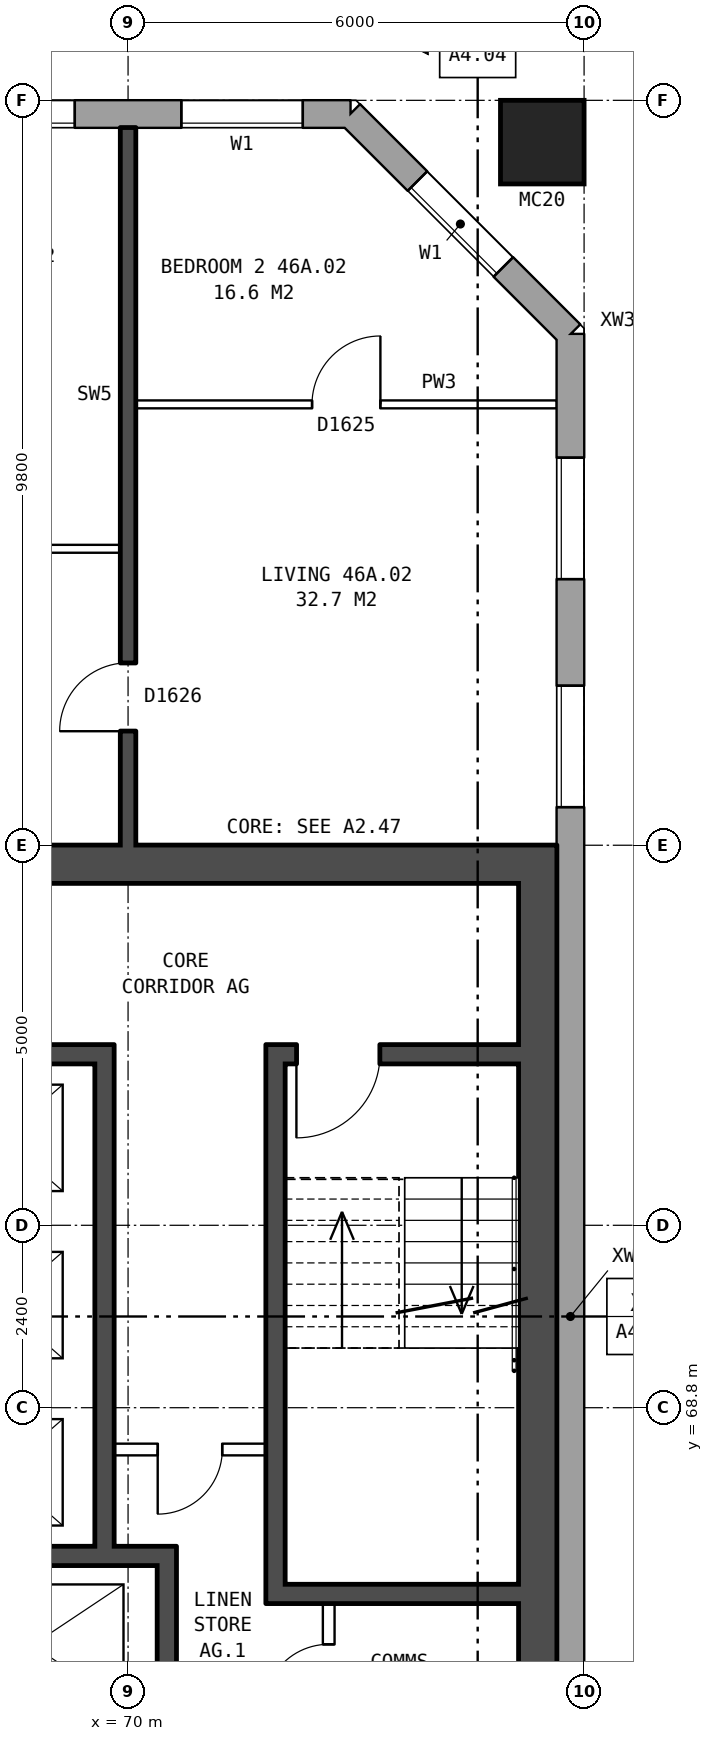
"""IFC4 building model, lengths in metres.
Left out: names, types, materials, properties, quantities, classifications, styles, units other than length and angle.
Written with IfcOpenShell. Run it as: python <this file> out.ifc"""

import sys

from ifc_helpers import new_model, si_unit, direction, frame, frame_2d, origin, origin_2d, place, context, subcontext, project, spatial, rectangle, hollow_rectangle, extrude, element, fill, save


model = new_model("IFC4")
c1 = context("Model", 3, precision=1e-05, world=origin(), true_north=direction((0.0, 1.0)))
c2 = subcontext(c1, "Body", "Model", "MODEL_VIEW")
j1 = project(units=[si_unit("LENGTHUNIT", "METRE"), si_unit("PLANEANGLEUNIT", "RADIAN")], contexts=[c1])
p1 = place(None, origin())
s1 = spatial("IfcSite", under=j1, at=p1, CompositionType="ELEMENT")
p2 = place(p1, origin())
s2 = spatial("IfcBuilding", under=s1, at=p2, CompositionType="ELEMENT")
p3 = place(p2, frame((0.0, 0.0, 164.0)))
s3 = spatial("IfcBuildingStorey", under=s2, at=p3, CompositionType="ELEMENT", Elevation=164.0)
p4 = place(p3, frame((75.45, 85.45, 0.0), z_axis=(0.0, 0.0, 1.0), x_axis=(1.0, 0.0, 0.0)))
e1 = element("IfcColumn", 1, at=p4, inside=s3, PredefinedType="COLUMN", context=c2, shape_type="SweptSolid", body=[
    extrude(hollow_rectangle(XDim=1.1, YDim=1.1, WallThickness=0.06, at=origin_2d()), origin(), (0.0, 0.0, 1.0), 3.1),
])
p5 = place(p3, frame((75.82, 57.075, 0.0), z_axis=(0.0, 0.0, 1.0), x_axis=(0.0, 1.0, 0.0)))
e2 = element("IfcWall", 2, at=p5, inside=s3, PredefinedType="STANDARD", context=c2, shape_type="SweptSolid", body=[
    extrude(rectangle(XDim=25.851, YDim=0.36, at=frame_2d((12.925, 0.0))), origin(), (0.0, 0.0, 1.0), 2.85),
])
p6 = place(p5, frame((1.625, 0.0, 0.8)))
e3 = element("IfcOpeningElement", 3, at=p6, cuts=e2, PredefinedType="OPENING", context=c2, shape_type="SweptSolid", body=[
    extrude(rectangle(XDim=1.6, YDim=1.8, at=frame_2d((0.8, 0.9))), frame((0.0, 0.19, 0.0), z_axis=(0.0, -1.0, 0.0), x_axis=(1.0, 0.0, 0.0)), (0.0, 0.0, 1.0), 0.38),
])
p7 = place(p5, frame((4.625, 0.0, 0.8)))
e4 = element("IfcOpeningElement", 4, at=p7, cuts=e2, PredefinedType="OPENING", context=c2, shape_type="SweptSolid", body=[
    extrude(rectangle(XDim=1.6, YDim=1.8, at=frame_2d((0.8, 0.9))), frame((0.0, 0.19, 0.0), z_axis=(0.0, -1.0, 0.0), x_axis=(1.0, 0.0, 0.0)), (0.0, 0.0, 1.0), 0.38),
])
p8 = place(p5, frame((19.625, 0.0, 0.8)))
e5 = element("IfcOpeningElement", 5, at=p8, cuts=e2, PredefinedType="OPENING", context=c2, shape_type="SweptSolid", body=[
    extrude(rectangle(XDim=1.6, YDim=1.8, at=frame_2d((0.8, 0.9))), frame((0.0, 0.19, 0.0), z_axis=(0.0, -1.0, 0.0), x_axis=(1.0, 0.0, 0.0)), (0.0, 0.0, 1.0), 0.38),
])
p9 = place(p5, frame((22.625, 0.0, 0.8)))
e6 = element("IfcOpeningElement", 6, at=p9, cuts=e2, PredefinedType="OPENING", context=c2, shape_type="SweptSolid", body=[
    extrude(rectangle(XDim=1.6, YDim=1.8, at=frame_2d((0.8, 0.9))), frame((0.0, 0.19, 0.0), z_axis=(0.0, -1.0, 0.0), x_axis=(1.0, 0.0, 0.0)), (0.0, 0.0, 1.0), 0.38),
])
p10 = place(p3, frame((75.82, 82.925, 0.0), z_axis=(0.0, 0.0, 1.0), x_axis=(-0.707106781187, 0.707106781187, 0.0)))
e7 = element("IfcWall", 7, at=p10, inside=s3, PredefinedType="STANDARD", context=c2, shape_type="SweptSolid", body=[
    extrude(rectangle(XDim=4.094, YDim=0.36, at=frame_2d((2.047, 0.0))), origin(), (0.0, 0.0, 1.0), 2.85),
])
p11 = place(p10, frame((1.247, 0.0, 0.8)))
e8 = element("IfcOpeningElement", 8, at=p11, cuts=e7, PredefinedType="OPENING", context=c2, shape_type="SweptSolid", body=[
    extrude(rectangle(XDim=1.6, YDim=1.8, at=frame_2d((0.8, 0.9))), frame((0.0, 0.19, 0.0), z_axis=(0.0, -1.0, 0.0), x_axis=(1.0, 0.0, 0.0)), (0.0, 0.0, 1.0), 0.38),
])
p12 = place(p3, frame((72.925, 85.82, 0.0), z_axis=(0.0, 0.0, 1.0), x_axis=(-1.0, 0.0, 0.0)))
e9 = element("IfcWall", 9, at=p12, inside=s3, PredefinedType="STANDARD", context=c2, shape_type="SweptSolid", body=[
    extrude(rectangle(XDim=41.351, YDim=0.36, at=frame_2d((20.675, 0.0))), origin(), (0.0, 0.0, 1.0), 2.85),
])
p13 = place(p12, frame((0.625, 0.0, 0.8)))
e10 = element("IfcOpeningElement", 10, at=p13, cuts=e9, PredefinedType="OPENING", context=c2, shape_type="SweptSolid", body=[
    extrude(rectangle(XDim=1.6, YDim=1.8, at=frame_2d((0.8, 0.9))), frame((0.0, 0.19, 0.0), z_axis=(0.0, -1.0, 0.0), x_axis=(1.0, 0.0, 0.0)), (0.0, 0.0, 1.0), 0.38),
])
p14 = place(p12, frame((3.625, 0.0, 0.8)))
e11 = element("IfcOpeningElement", 11, at=p14, cuts=e9, PredefinedType="OPENING", context=c2, shape_type="SweptSolid", body=[
    extrude(rectangle(XDim=1.6, YDim=1.8, at=frame_2d((0.8, 0.9))), frame((0.0, 0.19, 0.0), z_axis=(0.0, -1.0, 0.0), x_axis=(1.0, 0.0, 0.0)), (0.0, 0.0, 1.0), 0.38),
])
p15 = place(p12, frame((6.625, 0.0, 0.8)))
e12 = element("IfcOpeningElement", 12, at=p15, cuts=e9, PredefinedType="OPENING", context=c2, shape_type="SweptSolid", body=[
    extrude(rectangle(XDim=1.6, YDim=1.8, at=frame_2d((0.8, 0.9))), frame((0.0, 0.19, 0.0), z_axis=(0.0, -1.0, 0.0), x_axis=(1.0, 0.0, 0.0)), (0.0, 0.0, 1.0), 0.38),
])
p16 = place(p12, frame((9.625, 0.0, 0.8)))
e13 = element("IfcOpeningElement", 13, at=p16, cuts=e9, PredefinedType="OPENING", context=c2, shape_type="SweptSolid", body=[
    extrude(rectangle(XDim=1.6, YDim=1.8, at=frame_2d((0.8, 0.9))), frame((0.0, 0.19, 0.0), z_axis=(0.0, -1.0, 0.0), x_axis=(1.0, 0.0, 0.0)), (0.0, 0.0, 1.0), 0.38),
])
p17 = place(p12, frame((12.625, 0.0, 0.8)))
e14 = element("IfcOpeningElement", 14, at=p17, cuts=e9, PredefinedType="OPENING", context=c2, shape_type="SweptSolid", body=[
    extrude(rectangle(XDim=1.6, YDim=1.8, at=frame_2d((0.8, 0.9))), frame((0.0, 0.19, 0.0), z_axis=(0.0, -1.0, 0.0), x_axis=(1.0, 0.0, 0.0)), (0.0, 0.0, 1.0), 0.38),
])
p18 = place(p12, frame((15.625, 0.0, 0.8)))
e15 = element("IfcOpeningElement", 15, at=p18, cuts=e9, PredefinedType="OPENING", context=c2, shape_type="SweptSolid", body=[
    extrude(rectangle(XDim=1.6, YDim=1.8, at=frame_2d((0.8, 0.9))), frame((0.0, 0.19, 0.0), z_axis=(0.0, -1.0, 0.0), x_axis=(1.0, 0.0, 0.0)), (0.0, 0.0, 1.0), 0.38),
])
p19 = place(p12, frame((18.075, 0.0, 1.65)))
e16 = element("IfcOpeningElement", 16, at=p19, cuts=e9, PredefinedType="OPENING", context=c2, shape_type="SweptSolid", body=[
    extrude(rectangle(XDim=0.6, YDim=0.9, at=frame_2d((0.3, 0.45))), frame((0.0, 0.19, 0.0), z_axis=(0.0, -1.0, 0.0), x_axis=(1.0, 0.0, 0.0)), (0.0, 0.0, 1.0), 0.38),
])
p20 = place(p12, frame((21.125, 0.0, 0.15)))
e17 = element("IfcOpeningElement", 17, at=p20, cuts=e9, PredefinedType="OPENING", context=c2, shape_type="SweptSolid", body=[
    extrude(rectangle(XDim=1.0, YDim=0.9, at=frame_2d((0.5, 0.45))), frame((0.0, 0.19, 0.0), z_axis=(0.0, -1.0, 0.0), x_axis=(1.0, 0.0, 0.0)), (0.0, 0.0, 1.0), 0.38),
])
p21 = place(p12, frame((24.625, 0.0, 0.8)))
e18 = element("IfcOpeningElement", 18, at=p21, cuts=e9, PredefinedType="OPENING", context=c2, shape_type="SweptSolid", body=[
    extrude(rectangle(XDim=1.6, YDim=1.8, at=frame_2d((0.8, 0.9))), frame((0.0, 0.19, 0.0), z_axis=(0.0, -1.0, 0.0), x_axis=(1.0, 0.0, 0.0)), (0.0, 0.0, 1.0), 0.38),
])
p22 = place(p12, frame((27.625, 0.0, 0.8)))
e19 = element("IfcOpeningElement", 19, at=p22, cuts=e9, PredefinedType="OPENING", context=c2, shape_type="SweptSolid", body=[
    extrude(rectangle(XDim=1.6, YDim=1.8, at=frame_2d((0.8, 0.9))), frame((0.0, 0.19, 0.0), z_axis=(0.0, -1.0, 0.0), x_axis=(1.0, 0.0, 0.0)), (0.0, 0.0, 1.0), 0.38),
])
p23 = place(p12, frame((30.625, 0.0, 0.8)))
e20 = element("IfcOpeningElement", 20, at=p23, cuts=e9, PredefinedType="OPENING", context=c2, shape_type="SweptSolid", body=[
    extrude(rectangle(XDim=1.6, YDim=1.8, at=frame_2d((0.8, 0.9))), frame((0.0, 0.19, 0.0), z_axis=(0.0, -1.0, 0.0), x_axis=(1.0, 0.0, 0.0)), (0.0, 0.0, 1.0), 0.38),
])
p24 = place(p12, frame((33.625, 0.0, 0.8)))
e21 = element("IfcOpeningElement", 21, at=p24, cuts=e9, PredefinedType="OPENING", context=c2, shape_type="SweptSolid", body=[
    extrude(rectangle(XDim=1.6, YDim=1.8, at=frame_2d((0.8, 0.9))), frame((0.0, 0.19, 0.0), z_axis=(0.0, -1.0, 0.0), x_axis=(1.0, 0.0, 0.0)), (0.0, 0.0, 1.0), 0.38),
])
p25 = place(p12, frame((36.625, 0.0, 0.8)))
e22 = element("IfcOpeningElement", 22, at=p25, cuts=e9, PredefinedType="OPENING", context=c2, shape_type="SweptSolid", body=[
    extrude(rectangle(XDim=1.6, YDim=1.8, at=frame_2d((0.8, 0.9))), frame((0.0, 0.19, 0.0), z_axis=(0.0, -1.0, 0.0), x_axis=(1.0, 0.0, 0.0)), (0.0, 0.0, 1.0), 0.38),
])
p26 = place(p12, frame((19.225, 0.0, 0.15)))
e23 = element("IfcOpeningElement", 23, at=p26, cuts=e9, PredefinedType="OPENING", context=c2, shape_type="SweptSolid", body=[
    extrude(rectangle(XDim=0.6, YDim=0.9, at=frame_2d((0.3, 0.45))), frame((0.0, 0.19, 0.0), z_axis=(0.0, -1.0, 0.0), x_axis=(1.0, 0.0, 0.0)), (0.0, 0.0, 1.0), 0.38),
])
p27 = place(p12, frame((20.125, 0.0, 0.25)))
e24 = element("IfcOpeningElement", 24, at=p27, cuts=e9, PredefinedType="OPENING", context=c2, shape_type="SweptSolid", body=[
    extrude(rectangle(XDim=0.6, YDim=1.5, at=frame_2d((0.3, 0.75))), frame((0.0, 0.19, 0.0), z_axis=(0.0, -1.0, 0.0), x_axis=(1.0, 0.0, 0.0)), (0.0, 0.0, 1.0), 0.38),
])
p28 = place(p12, frame((22.625, 0.0, 1.65)))
e25 = element("IfcOpeningElement", 25, at=p28, cuts=e9, PredefinedType="OPENING", context=c2, shape_type="SweptSolid", body=[
    extrude(rectangle(XDim=1.0, YDim=0.9, at=frame_2d((0.5, 0.45))), frame((0.0, 0.19, 0.0), z_axis=(0.0, -1.0, 0.0), x_axis=(1.0, 0.0, 0.0)), (0.0, 0.0, 1.0), 0.38),
])
p29 = place(p3, frame((75.39, 63.8, 0.0), z_axis=(0.0, 0.0, 1.0), x_axis=(0.0, 1.0, 0.0)))
e26 = element("IfcWall", 26, at=p29, inside=s3, PredefinedType="SHEAR", context=c2, shape_type="SweptSolid", body=[
    extrude(rectangle(XDim=12.4, YDim=0.5, at=frame_2d((6.2, 0.0))), origin(), (0.0, 0.0, 1.0), 2.85),
])
p30 = place(p3, frame((67.14, 75.95, 0.0), z_axis=(0.0, 0.0, 1.0), x_axis=(1.0, 0.0, 0.0)))
e27 = element("IfcWall", 27, at=p30, inside=s3, PredefinedType="SHEAR", context=c2, shape_type="SweptSolid", body=[
    extrude(rectangle(XDim=8.0, YDim=0.5, at=frame_2d((4.0, 0.0))), origin(), (0.0, 0.0, 1.0), 2.85),
])
p31 = place(p3, frame((72.065, 66.35, 0.0), z_axis=(0.0, 0.0, 1.0), x_axis=(1.0, 0.0, 0.0)))
e28 = element("IfcWall", 28, at=p31, inside=s3, PredefinedType="SHEAR", context=c2, shape_type="SweptSolid", body=[
    extrude(rectangle(XDim=3.075, YDim=0.25, at=frame_2d((1.538, 0.0))), origin(), (0.0, 0.0, 1.0), 2.85),
])
p32 = place(p3, frame((67.14, 66.85, 0.0), z_axis=(0.0, 0.0, 1.0), x_axis=(1.0, 0.0, 0.0)))
e29 = element("IfcWall", 29, at=p32, inside=s3, PredefinedType="SHEAR", context=c2, shape_type="SweptSolid", body=[
    extrude(rectangle(XDim=3.495, YDim=0.25, at=frame_2d((1.748, 0.0))), origin(), (0.0, 0.0, 1.0), 2.85),
])
p33 = place(p3, frame((69.815, 68.25, 0.0), z_axis=(0.0, 0.0, 1.0), x_axis=(1.0, 0.0, 0.0)))
e30 = element("IfcWall", 30, at=p33, inside=s3, PredefinedType="PARTITIONING", context=c2, shape_type="SweptSolid", body=[
    extrude(rectangle(XDim=2.0, YDim=0.15, at=frame_2d((1.0, 0.0))), origin(), (0.0, 0.0, 1.0), 2.85),
])
p34 = place(p33, frame((0.575, 0.0, 0.0)))
e31 = element("IfcOpeningElement", 31, at=p34, cuts=e30, PredefinedType="OPENING", context=c2, shape_type="SweptSolid", body=[
    extrude(rectangle(XDim=0.85, YDim=2.1, at=frame_2d((0.425, 1.05))), frame((0.0, 0.085, 0.0), z_axis=(0.0, -1.0, 0.0), x_axis=(1.0, 0.0, 0.0)), (0.0, 0.0, 1.0), 0.17),
])
p35 = place(p3, frame((67.14, 73.45, 0.0), z_axis=(0.0, 0.0, 1.0), x_axis=(1.0, 0.0, 0.0)))
e32 = element("IfcWall", 32, at=p35, inside=s3, PredefinedType="SHEAR", context=c2, shape_type="SweptSolid", body=[
    extrude(rectangle(XDim=2.425, YDim=0.25, at=frame_2d((1.212, 0.0))), origin(), (0.0, 0.0, 1.0), 2.85),
])
p36 = place(p3, frame((72.065, 73.45, 0.0), z_axis=(0.0, 0.0, 1.0), x_axis=(1.0, 0.0, 0.0)))
e33 = element("IfcWall", 33, at=p36, inside=s3, PredefinedType="SHEAR", context=c2, shape_type="SweptSolid", body=[
    extrude(rectangle(XDim=3.075, YDim=0.25, at=frame_2d((1.538, 0.0))), origin(), (0.0, 0.0, 1.0), 2.85),
])
p37 = place(p36, frame((0.15, 0.0, 0.0)))
e34 = element("IfcOpeningElement", 34, at=p37, cuts=e33, PredefinedType="OPENING", context=c2, shape_type="SweptSolid", body=[
    extrude(rectangle(XDim=1.1, YDim=2.1, at=frame_2d((0.55, 1.05))), frame((0.0, 0.135, 0.0), z_axis=(0.0, -1.0, 0.0), x_axis=(1.0, 0.0, 0.0)), (0.0, 0.0, 1.0), 0.27),
])
p38 = place(p3, frame((69.69, 66.975, 0.0), z_axis=(0.0, 0.0, 1.0), x_axis=(0.0, 1.0, 0.0)))
e35 = element("IfcWall", 35, at=p38, inside=s3, PredefinedType="SHEAR", context=c2, shape_type="SweptSolid", body=[
    extrude(rectangle(XDim=6.6, YDim=0.25, at=frame_2d((3.3, 0.0))), origin(), (0.0, 0.0, 1.0), 2.85),
])
p39 = place(p3, frame((70.51, 64.3, 0.0), z_axis=(0.0, 0.0, 1.0), x_axis=(0.0, 1.0, 0.0)))
e36 = element("IfcWall", 36, at=p39, inside=s3, PredefinedType="SHEAR", context=c2, shape_type="SweptSolid", body=[
    extrude(rectangle(XDim=2.425, YDim=0.25, at=frame_2d((1.212, 0.0))), origin(), (0.0, 0.0, 1.0), 2.85),
])
p40 = place(p3, frame((71.94, 66.225, 0.0), z_axis=(0.0, 0.0, 1.0), x_axis=(0.0, 1.0, 0.0)))
e37 = element("IfcWall", 37, at=p40, inside=s3, PredefinedType="SHEAR", context=c2, shape_type="SweptSolid", body=[
    extrude(rectangle(XDim=7.35, YDim=0.25, at=frame_2d((3.675, 0.0))), origin(), (0.0, 0.0, 1.0), 2.85),
])
p41 = place(p3, frame((72.64, 64.3, 0.0), z_axis=(0.0, 0.0, 1.0), x_axis=(0.0, 1.0, 0.0)))
e38 = element("IfcWall", 38, at=p41, inside=s3, PredefinedType="PARTITIONING", context=c2, shape_type="SweptSolid", body=[
    extrude(rectangle(XDim=1.925, YDim=0.15, at=frame_2d((0.962, 0.0))), origin(), (0.0, 0.0, 1.0), 2.85),
])
p42 = place(p41, frame((0.538, 0.0, 0.0)))
e39 = element("IfcOpeningElement", 39, at=p42, cuts=e38, PredefinedType="OPENING", context=c2, shape_type="SweptSolid", body=[
    extrude(rectangle(XDim=0.85, YDim=2.1, at=frame_2d((0.425, 1.05))), frame((0.0, 0.085, 0.0), z_axis=(0.0, -1.0, 0.0), x_axis=(1.0, 0.0, 0.0)), (0.0, 0.0, 1.0), 0.17),
])
p43 = place(p3, frame((64.1, 80.1, 0.0), z_axis=(0.0, 0.0, 1.0), x_axis=(1.0, 0.0, 0.0)))
e40 = element("IfcWall", 40, at=p43, inside=s3, PredefinedType="PARTITIONING", context=c2, shape_type="SweptSolid", body=[
    extrude(rectangle(XDim=5.8, YDim=0.1, at=frame_2d((2.9, 0.0))), origin(), (0.0, 0.0, 1.0), 2.85),
])
p44 = place(p43, frame((3.6, 0.0, 0.0)))
e41 = element("IfcOpeningElement", 41, at=p44, cuts=e40, PredefinedType="OPENING", context=c2, shape_type="SweptSolid", body=[
    extrude(rectangle(XDim=0.9, YDim=2.1, at=frame_2d((0.45, 1.05))), frame((0.0, 0.06, 0.0), z_axis=(0.0, -1.0, 0.0), x_axis=(1.0, 0.0, 0.0)), (0.0, 0.0, 1.0), 0.12),
])
p45 = place(p43, frame((0.7, 0.0, 0.0)))
e42 = element("IfcOpeningElement", 42, at=p45, cuts=e40, PredefinedType="OPENING", context=c2, shape_type="SweptSolid", body=[
    extrude(rectangle(XDim=0.9, YDim=2.1, at=frame_2d((0.45, 1.05))), frame((0.0, 0.06, 0.0), z_axis=(0.0, -1.0, 0.0), x_axis=(1.0, 0.0, 0.0)), (0.0, 0.0, 1.0), 0.12),
])
p46 = place(p3, frame((70.1, 82.0, 0.0), z_axis=(0.0, 0.0, 1.0), x_axis=(1.0, 0.0, 0.0)))
e43 = element("IfcWall", 43, at=p46, inside=s3, PredefinedType="PARTITIONING", context=c2, shape_type="SweptSolid", body=[
    extrude(rectangle(XDim=5.54, YDim=0.1, at=frame_2d((2.77, 0.0))), origin(), (0.0, 0.0, 1.0), 2.85),
])
p47 = place(p46, frame((2.32, 0.0, 0.0)))
e44 = element("IfcOpeningElement", 44, at=p47, cuts=e43, PredefinedType="OPENING", context=c2, shape_type="SweptSolid", body=[
    extrude(rectangle(XDim=0.9, YDim=2.1, at=frame_2d((0.45, 1.05))), frame((0.0, 0.06, 0.0), z_axis=(0.0, -1.0, 0.0), x_axis=(1.0, 0.0, 0.0)), (0.0, 0.0, 1.0), 0.12),
])
p48 = place(p3, frame((70.0, 76.2, 0.0), z_axis=(0.0, 0.0, 1.0), x_axis=(0.0, 1.0, 0.0)))
e45 = element("IfcWall", 45, at=p48, inside=s3, PredefinedType="SOLIDWALL", context=c2, shape_type="SweptSolid", body=[
    extrude(rectangle(XDim=9.44, YDim=0.2, at=frame_2d((4.72, 0.0))), origin(), (0.0, 0.0, 1.0), 2.85),
])
p49 = place(p48, frame((1.5, 0.0, 0.0)))
e46 = element("IfcOpeningElement", 46, at=p49, cuts=e45, PredefinedType="OPENING", context=c2, shape_type="SweptSolid", body=[
    extrude(rectangle(XDim=0.9, YDim=2.1, at=frame_2d((0.45, 1.05))), frame((0.0, 0.11, 0.0), z_axis=(0.0, -1.0, 0.0), x_axis=(1.0, 0.0, 0.0)), (0.0, 0.0, 1.0), 0.22),
])
p50 = place(p8, origin())
e47 = element("IfcWindow", 47, at=p50, inside=s3, PartitioningType="SINGLE_PANEL", PredefinedType="WINDOW", context=c2, shape_type="SweptSolid", body=[
    extrude(rectangle(XDim=1.6, YDim=1.8, at=frame_2d((0.8, 0.9))), frame((0.0, 0.15, 0.0), z_axis=(0.0, -1.0, 0.0), x_axis=(1.0, 0.0, 0.0)), (0.0, 0.0, 1.0), 0.06),
])
fill(e5, e47)
p51 = place(p9, origin())
e48 = element("IfcWindow", 48, at=p51, inside=s3, PartitioningType="SINGLE_PANEL", PredefinedType="WINDOW", context=c2, shape_type="SweptSolid", body=[
    extrude(rectangle(XDim=1.6, YDim=1.8, at=frame_2d((0.8, 0.9))), frame((0.0, 0.15, 0.0), z_axis=(0.0, -1.0, 0.0), x_axis=(1.0, 0.0, 0.0)), (0.0, 0.0, 1.0), 0.06),
])
fill(e6, e48)
p52 = place(p11, origin())
e49 = element("IfcWindow", 49, at=p52, inside=s3, PartitioningType="SINGLE_PANEL", PredefinedType="WINDOW", context=c2, shape_type="SweptSolid", body=[
    extrude(rectangle(XDim=1.6, YDim=1.8, at=frame_2d((0.8, 0.9))), frame((0.0, 0.15, 0.0), z_axis=(0.0, -1.0, 0.0), x_axis=(1.0, 0.0, 0.0)), (0.0, 0.0, 1.0), 0.06),
])
fill(e8, e49)
p53 = place(p13, origin())
e50 = element("IfcWindow", 50, at=p53, inside=s3, PartitioningType="SINGLE_PANEL", PredefinedType="WINDOW", context=c2, shape_type="SweptSolid", body=[
    extrude(rectangle(XDim=1.6, YDim=1.8, at=frame_2d((0.8, 0.9))), frame((0.0, 0.15, 0.0), z_axis=(0.0, -1.0, 0.0), x_axis=(1.0, 0.0, 0.0)), (0.0, 0.0, 1.0), 0.06),
])
fill(e10, e50)
p54 = place(p14, origin())
e51 = element("IfcWindow", 51, at=p54, inside=s3, PartitioningType="SINGLE_PANEL", PredefinedType="WINDOW", context=c2, shape_type="SweptSolid", body=[
    extrude(rectangle(XDim=1.6, YDim=1.8, at=frame_2d((0.8, 0.9))), frame((0.0, 0.15, 0.0), z_axis=(0.0, -1.0, 0.0), x_axis=(1.0, 0.0, 0.0)), (0.0, 0.0, 1.0), 0.06),
])
fill(e11, e51)
p55 = place(p37, frame((1.1, 0.0, 0.0), z_axis=(0.0, 0.0, 1.0), x_axis=(-1.0, 0.0, 0.0)))
e52 = element("IfcDoor", 52, at=p55, inside=s3, OperationType="SINGLE_SWING_RIGHT", PredefinedType="DOOR", context=c2, shape_type="SweptSolid", body=[
    extrude(rectangle(XDim=1.1, YDim=2.1, at=frame_2d((0.55, 1.05))), frame((0.0, 0.025, 0.0), z_axis=(0.0, -1.0, 0.0), x_axis=(1.0, 0.0, 0.0)), (0.0, 0.0, 1.0), 0.05),
])
fill(e34, e52)
p56 = place(p34, frame((0.85, 0.0, 0.0), z_axis=(0.0, 0.0, 1.0), x_axis=(-1.0, 0.0, 0.0)))
e53 = element("IfcDoor", 53, at=p56, inside=s3, OperationType="SINGLE_SWING_RIGHT", PredefinedType="DOOR", context=c2, shape_type="SweptSolid", body=[
    extrude(rectangle(XDim=0.85, YDim=2.1, at=frame_2d((0.425, 1.05))), frame((0.0, 0.025, 0.0), z_axis=(0.0, -1.0, 0.0), x_axis=(1.0, 0.0, 0.0)), (0.0, 0.0, 1.0), 0.05),
])
fill(e31, e53)
p57 = place(p42, origin())
e54 = element("IfcDoor", 54, at=p57, inside=s3, OperationType="SINGLE_SWING_LEFT", PredefinedType="DOOR", context=c2, shape_type="SweptSolid", body=[
    extrude(rectangle(XDim=0.85, YDim=2.1, at=frame_2d((0.425, 1.05))), frame((0.0, 0.025, 0.0), z_axis=(0.0, -1.0, 0.0), x_axis=(1.0, 0.0, 0.0)), (0.0, 0.0, 1.0), 0.05),
])
fill(e39, e54)
p58 = place(p47, origin())
e55 = element("IfcDoor", 55, at=p58, inside=s3, OperationType="SINGLE_SWING_RIGHT", PredefinedType="DOOR", context=c2, shape_type="SweptSolid", body=[
    extrude(rectangle(XDim=0.9, YDim=2.1, at=frame_2d((0.45, 1.05))), frame((0.0, 0.025, 0.0), z_axis=(0.0, -1.0, 0.0), x_axis=(1.0, 0.0, 0.0)), (0.0, 0.0, 1.0), 0.05),
])
fill(e44, e55)
p59 = place(p49, origin())
e56 = element("IfcDoor", 56, at=p59, inside=s3, OperationType="SINGLE_SWING_LEFT", PredefinedType="DOOR", context=c2, shape_type="SweptSolid", body=[
    extrude(rectangle(XDim=0.9, YDim=2.1, at=frame_2d((0.45, 1.05))), frame((0.0, 0.025, 0.0), z_axis=(0.0, -1.0, 0.0), x_axis=(1.0, 0.0, 0.0)), (0.0, 0.0, 1.0), 0.05),
])
fill(e46, e56)
save(model, sys.argv[1])
